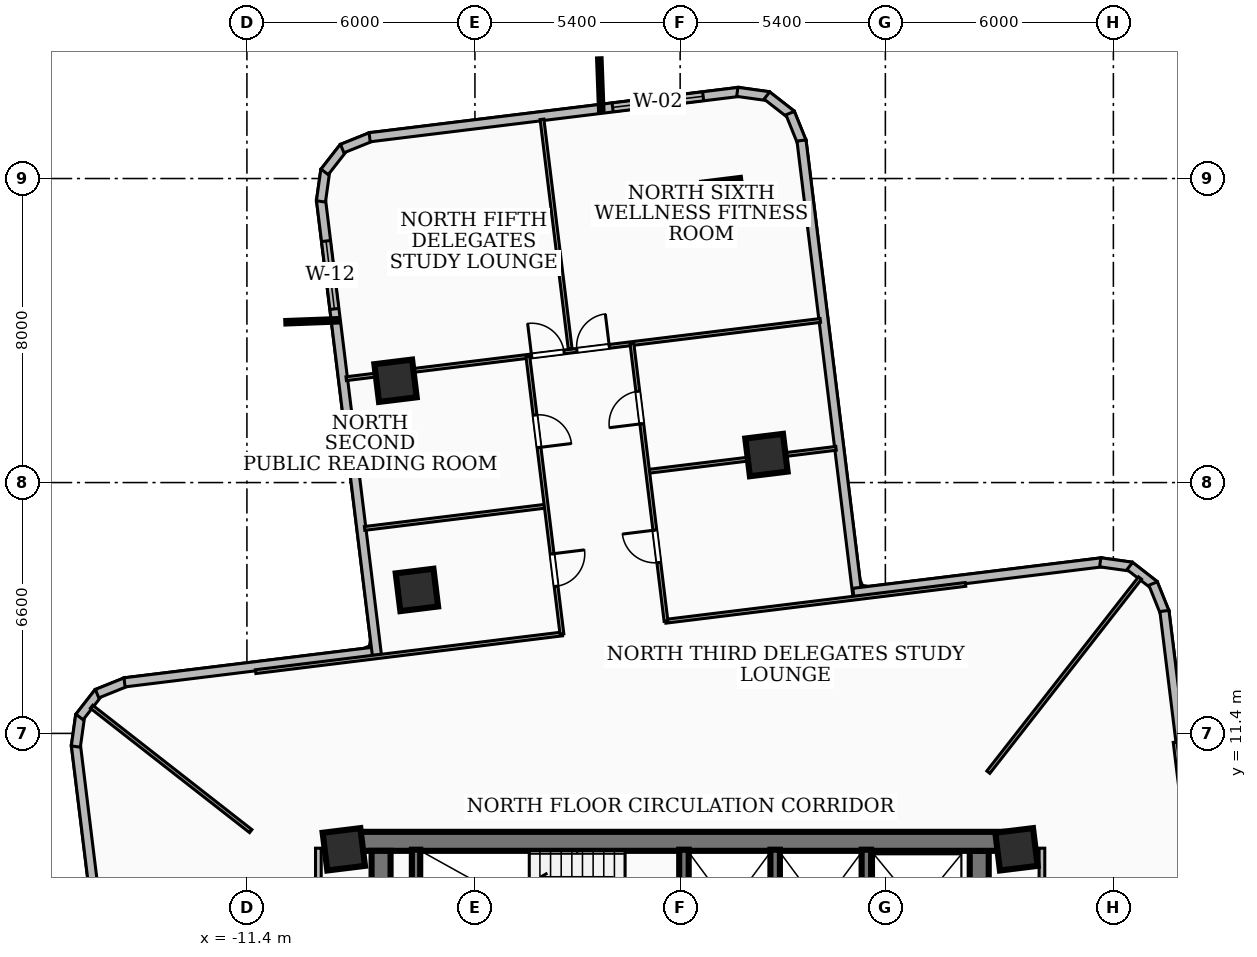
"""IFC4 building model, lengths in metres.
Left out: names, types, materials, properties, quantities, classifications, styles, units other than length and angle.
Written with IfcOpenShell. Run it as: python <this file> out.ifc"""

import sys

from ifc_helpers import new_model, si_unit, direction, frame, frame_2d, origin, origin_2d, place, context, subcontext, project, spatial, rectangle, extrude, element, fill, save


model = new_model("IFC4")
c1 = context("Model", 3, precision=1e-05, world=origin(), true_north=direction((0.0, 1.0)))
c2 = subcontext(c1, "Body", "Model", "MODEL_VIEW")
j1 = project(units=[si_unit("LENGTHUNIT", "METRE"), si_unit("PLANEANGLEUNIT", "RADIAN")], contexts=[c1])
p1 = place(None, origin())
s1 = spatial("IfcSite", under=j1, at=p1, CompositionType="ELEMENT")
p2 = place(p1, origin())
s2 = spatial("IfcBuilding", under=s1, at=p2, CompositionType="ELEMENT")
p3 = place(p2, frame((0.0, 0.0, 78.48)))
s3 = spatial("IfcBuildingStorey", under=s2, at=p3, CompositionType="ELEMENT", Elevation=78.48)
p4 = place(p3, frame((-8.78, 8.56, 0.0), z_axis=(0.0, 0.0, 1.0), x_axis=(1.0, 0.0, 0.0)))
e1 = element("IfcWall", 1, at=p4, inside=s3, PredefinedType="SHEAR", context=c2, shape_type="SweptSolid", body=[
    extrude(rectangle(XDim=17.56, YDim=0.5, at=frame_2d((8.78, 0.0))), origin(), (0.0, 0.0, 1.0), 3.34),
])
for number, where, z_axis, x_axis in (
    (2, (-7.87, 2.0, 0.0), (0.0, 0.0, 1.0), (0.0, 1.0, 0.0)),
    (3, (7.87, 8.31, 0.0), (0.0, 0.0, 1.0), (0.0, -1.0, 0.0)),
):
    element("IfcWall", number, at=place(p3, frame(where, z_axis=z_axis, x_axis=x_axis)), inside=s3, PredefinedType="SHEAR", context=c2, shape_type="SweptSolid", body=[
        extrude(rectangle(XDim=6.31, YDim=0.5, at=frame_2d((3.155, 0.0))), origin(), (0.0, 0.0, 1.0), 3.34),
    ])
p5 = place(p3, frame((-6.95, 5.28, 0.0), z_axis=(0.0, 0.0, 1.0), x_axis=(0.0, 1.0, 0.0)))
e4 = element("IfcWall", 4, at=p5, inside=s3, PredefinedType="SOLIDWALL", context=c2, shape_type="SweptSolid", body=[
    extrude(rectangle(XDim=3.06, YDim=0.22, at=frame_2d((1.53, 0.0))), origin(), (0.0, 0.0, 1.0), 3.34),
])
for number, where, z_axis, x_axis in (
    (5, (0.1, 5.3, 0.0), (0.0, 0.0, 1.0), (0.0, 1.0, 0.0)),
    (6, (2.5, 5.3, 0.0), (0.0, 0.0, 1.0), (0.0, 1.0, 0.0)),
    (7, (4.9, 5.3, 0.0), (0.0, 0.0, 1.0), (0.0, 1.0, 0.0)),
):
    element("IfcWall", number, at=place(p3, frame(where, z_axis=z_axis, x_axis=x_axis)), inside=s3, PredefinedType="SOLIDWALL", context=c2, shape_type="SweptSolid", body=[
        extrude(rectangle(XDim=3.04, YDim=0.25, at=frame_2d((1.52, 0.0))), origin(), (0.0, 0.0, 1.0), 3.34),
    ])
for number, where, z_axis, x_axis in (
    (8, (-8.85, 8.35, 0.0), (0.0, 0.0, 1.0), (0.993, 0.122, 0.0)),
    (9, (8.85, 8.35, 0.0), (0.0, 0.0, 1.0), (0.993, 0.122, 0.0)),
    (10, (2.271, 18.724, 0.0), (0.0, 0.0, 1.0), (0.993, 0.122, 0.0)),
    (11, (-6.927, 15.175, 0.0), (0.0, 0.0, 1.0), (0.993, 0.122, 0.0)),
    (12, (1.139, 25.457, 0.0), (0.0, 0.0, 1.0), (0.993, 0.122, 0.0)),
    (13, (-7.489, 20.679, 0.0), (0.0, 0.0, 1.0), (0.993, 0.122, 0.0)),
):
    element("IfcColumn", number, at=place(p3, frame(where, z_axis=z_axis, x_axis=x_axis)), inside=s3, PredefinedType="COLUMN", context=c2, shape_type="SweptSolid", body=[
        extrude(rectangle(XDim=1.0, YDim=1.0, at=origin_2d()), origin(), (0.0, 0.0, 1.0), 3.6),
    ])
p6 = place(p3, frame((-15.098, 4.558, 0.0), z_axis=(0.0, 0.0, 1.0), x_axis=(-0.121938646341, 0.992537639855, 0.0)))
e14 = element("IfcWall", 14, at=p6, inside=s3, PredefinedType="SOLIDWALL", context=c2, shape_type="SweptSolid", body=[
    extrude(rectangle(XDim=6.595, YDim=0.24, at=frame_2d((3.298, 0.0))), origin(), (0.0, 0.0, 1.0), 3.34),
])
p7 = place(p3, frame((-15.902, 11.054, 0.0), z_axis=(0.0, 0.0, 1.0), x_axis=(0.138376981782, 0.990379629694, 0.0)))
e15 = element("IfcWall", 15, at=p7, inside=s3, PredefinedType="SOLIDWALL", context=c2, shape_type="SweptSolid", body=[
    extrude(rectangle(XDim=0.831, YDim=0.24, at=frame_2d((0.416, 0.0))), origin(), (0.0, 0.0, 1.0), 3.34),
])
p8 = place(p3, frame((-15.805, 11.832, 0.0), z_axis=(0.0, 0.0, 1.0), x_axis=(0.614397431824, 0.788996702001, 0.0)))
e16 = element("IfcWall", 16, at=p8, inside=s3, PredefinedType="SOLIDWALL", context=c2, shape_type="SweptSolid", body=[
    extrude(rectangle(XDim=0.814, YDim=0.24, at=frame_2d((0.407, 0.0))), origin(), (0.0, 0.0, 1.0), 3.34),
])
p9 = place(p3, frame((-15.343, 12.445, 0.0), z_axis=(0.0, 0.0, 1.0), x_axis=(0.927724225254, 0.37326634174, 0.0)))
e17 = element("IfcWall", 17, at=p9, inside=s3, PredefinedType="SOLIDWALL", context=c2, shape_type="SweptSolid", body=[
    extrude(rectangle(XDim=0.83, YDim=0.24, at=frame_2d((0.415, 0.0))), origin(), (0.0, 0.0, 1.0), 3.34),
])
p10 = place(p3, frame((-14.621, 12.743, 0.0), z_axis=(0.0, 0.0, 1.0), x_axis=(0.992536263595, 0.121949848087, 0.0)))
e18 = element("IfcWall", 18, at=p10, inside=s3, PredefinedType="SOLIDWALL", context=c2, shape_type="SweptSolid", body=[
    extrude(rectangle(XDim=6.775, YDim=0.24, at=frame_2d((3.387, 0.0))), origin(), (0.0, 0.0, 1.0), 3.34),
])
p11 = place(p3, frame((-7.98, 13.462, 0.0), z_axis=(0.0, 0.0, 1.0), x_axis=(-0.12189689255, 0.992542768644, 0.0)))
e19 = element("IfcWall", 19, at=p11, inside=s3, PredefinedType="SOLIDWALL", context=c2, shape_type="SweptSolid", body=[
    extrude(rectangle(XDim=12.075, YDim=0.24, at=frame_2d((6.038, 0.0))), origin(), (0.0, 0.0, 1.0), 3.34),
])
p12 = place(p11, frame((9.175, 0.0, 0.85)))
e20 = element("IfcOpeningElement", 20, at=p12, cuts=e19, PredefinedType="OPENING", context=c2, shape_type="SweptSolid", body=[
    extrude(rectangle(XDim=1.8, YDim=1.6, at=frame_2d((0.9, 0.8))), frame((0.0, 0.13, 0.0), z_axis=(0.0, -1.0, 0.0), x_axis=(1.0, 0.0, 0.0)), (0.0, 0.0, 1.0), 0.26),
])
p13 = place(p3, frame((-9.452, 25.397, 0.0), z_axis=(0.0, 0.0, 1.0), x_axis=(0.138376981782, 0.990379629694, 0.0)))
e21 = element("IfcWall", 21, at=p13, inside=s3, PredefinedType="SOLIDWALL", context=c2, shape_type="SweptSolid", body=[
    extrude(rectangle(XDim=0.831, YDim=0.24, at=frame_2d((0.416, 0.0))), origin(), (0.0, 0.0, 1.0), 3.34),
])
p14 = place(p3, frame((-9.355, 26.175, 0.0), z_axis=(0.0, 0.0, 1.0), x_axis=(0.614542882467, 0.788883416995, 0.0)))
e22 = element("IfcWall", 22, at=p14, inside=s3, PredefinedType="SOLIDWALL", context=c2, shape_type="SweptSolid", body=[
    extrude(rectangle(XDim=0.814, YDim=0.24, at=frame_2d((0.407, 0.0))), origin(), (0.0, 0.0, 1.0), 3.34),
])
p15 = place(p3, frame((-8.893, 26.788, 0.0), z_axis=(0.0, 0.0, 1.0), x_axis=(0.927724225254, 0.37326634174, 0.0)))
e23 = element("IfcWall", 23, at=p15, inside=s3, PredefinedType="SOLIDWALL", context=c2, shape_type="SweptSolid", body=[
    extrude(rectangle(XDim=0.83, YDim=0.24, at=frame_2d((0.415, 0.0))), origin(), (0.0, 0.0, 1.0), 3.34),
])
p16 = place(p3, frame((-8.171, 27.086, 0.0), z_axis=(0.0, 0.0, 1.0), x_axis=(0.992545782156, 0.121872352585, 0.0)))
e24 = element("IfcWall", 24, at=p16, inside=s3, PredefinedType="SOLIDWALL", context=c2, shape_type="SweptSolid", body=[
    extrude(rectangle(XDim=9.798, YDim=0.24, at=frame_2d((4.899, 0.0))), origin(), (0.0, 0.0, 1.0), 3.34),
])
p17 = place(p16, frame((6.442, 0.0, 0.85)))
e25 = element("IfcOpeningElement", 25, at=p17, cuts=e24, PredefinedType="OPENING", context=c2, shape_type="SweptSolid", body=[
    extrude(rectangle(XDim=2.4, YDim=2.1, at=frame_2d((1.2, 1.05))), frame((0.0, 0.13, 0.0), z_axis=(0.0, -1.0, 0.0), x_axis=(1.0, 0.0, 0.0)), (0.0, 0.0, 1.0), 0.26),
])
p18 = place(p3, frame((1.504, 28.28, 0.0), z_axis=(0.0, 0.0, 1.0), x_axis=(0.990540037659, -0.137224027762, 0.0)))
e26 = element("IfcWall", 26, at=p18, inside=s3, PredefinedType="SOLIDWALL", context=c2, shape_type="SweptSolid", body=[
    extrude(rectangle(XDim=0.831, YDim=0.24, at=frame_2d((0.416, 0.0))), origin(), (0.0, 0.0, 1.0), 3.34),
])
p19 = place(p3, frame((2.282, 28.184, 0.0), z_axis=(0.0, 0.0, 1.0), x_axis=(0.788415071083, -0.615143622001, 0.0)))
e27 = element("IfcWall", 27, at=p19, inside=s3, PredefinedType="SOLIDWALL", context=c2, shape_type="SweptSolid", body=[
    extrude(rectangle(XDim=0.814, YDim=0.24, at=frame_2d((0.407, 0.0))), origin(), (0.0, 0.0, 1.0), 3.34),
])
p20 = place(p3, frame((2.895, 27.721, 0.0), z_axis=(0.0, 0.0, 1.0), x_axis=(0.373927487679, -0.927457941881, 0.0)))
e28 = element("IfcWall", 28, at=p20, inside=s3, PredefinedType="SOLIDWALL", context=c2, shape_type="SweptSolid", body=[
    extrude(rectangle(XDim=0.829, YDim=0.24, at=frame_2d((0.415, 0.0))), origin(), (0.0, 0.0, 1.0), 3.34),
])
p21 = place(p3, frame((3.193, 27.0, 0.0), z_axis=(0.0, 0.0, 1.0), x_axis=(0.12189689255, -0.992542768644, 0.0)))
e29 = element("IfcWall", 29, at=p21, inside=s3, PredefinedType="SOLIDWALL", context=c2, shape_type="SweptSolid", body=[
    extrude(rectangle(XDim=12.075, YDim=0.24, at=frame_2d((6.038, 0.0))), origin(), (0.0, 0.0, 1.0), 2.486),
])
p22 = place(p3, frame((4.558, 15.098, 0.0), z_axis=(0.0, 0.0, 1.0), x_axis=(0.992537639855, 0.121938646341, 0.0)))
e30 = element("IfcWall", 30, at=p22, inside=s3, PredefinedType="SOLIDWALL", context=c2, shape_type="SweptSolid", body=[
    extrude(rectangle(XDim=6.595, YDim=0.24, at=frame_2d((3.298, 0.0))), origin(), (0.0, 0.0, 1.0), 2.486),
])
p23 = place(p3, frame((11.054, 15.902, 0.0), z_axis=(0.0, 0.0, 1.0), x_axis=(0.990379629694, -0.138376981782, 0.0)))
e31 = element("IfcWall", 31, at=p23, inside=s3, PredefinedType="SOLIDWALL", context=c2, shape_type="SweptSolid", body=[
    extrude(rectangle(XDim=0.831, YDim=0.24, at=frame_2d((0.416, 0.0))), origin(), (0.0, 0.0, 1.0), 3.34),
])
p24 = place(p3, frame((11.832, 15.805, 0.0), z_axis=(0.0, 0.0, 1.0), x_axis=(0.788996702001, -0.614397431824, 0.0)))
e32 = element("IfcWall", 32, at=p24, inside=s3, PredefinedType="SOLIDWALL", context=c2, shape_type="SweptSolid", body=[
    extrude(rectangle(XDim=0.814, YDim=0.24, at=frame_2d((0.407, 0.0))), origin(), (0.0, 0.0, 1.0), 3.34),
])
p25 = place(p3, frame((12.445, 15.343, 0.0), z_axis=(0.0, 0.0, 1.0), x_axis=(0.37326634174, -0.927724225254, 0.0)))
e33 = element("IfcWall", 33, at=p25, inside=s3, PredefinedType="SOLIDWALL", context=c2, shape_type="SweptSolid", body=[
    extrude(rectangle(XDim=0.83, YDim=0.24, at=frame_2d((0.415, 0.0))), origin(), (0.0, 0.0, 1.0), 3.34),
])
p26 = place(p3, frame((12.743, 14.621, 0.0), z_axis=(0.0, 0.0, 1.0), x_axis=(0.121949848087, -0.992536263595, 0.0)))
e34 = element("IfcWall", 34, at=p26, inside=s3, PredefinedType="SOLIDWALL", context=c2, shape_type="SweptSolid", body=[
    extrude(rectangle(XDim=6.775, YDim=0.24, at=frame_2d((3.387, 0.0))), origin(), (0.0, 0.0, 1.0), 2.644),
])
for number, where, z_axis, x_axis in (
    (35, (-9.52, 1.75, 0.0), (0.0, 0.0, 1.0), (0.0, 1.0, 0.0)),
    (36, (9.52, 1.75, 0.0), (0.0, 0.0, 1.0), (0.0, 1.0, 0.0)),
):
    element("IfcWall", number, at=place(p3, frame(where, z_axis=z_axis, x_axis=x_axis)), inside=s3, PredefinedType="PARTITIONING", context=c2, shape_type="SweptSolid", body=[
        extrude(rectangle(XDim=6.63, YDim=0.15, at=frame_2d((3.315, 0.0))), origin(), (0.0, 0.0, 1.0), 2.486),
    ])
p27 = place(p3, frame((8.11, 10.38, 0.0), z_axis=(0.0, 0.0, 1.0), x_axis=(0.615665236773, 0.788007814828, 0.0)))
e37 = element("IfcWall", 37, at=p27, inside=s3, PredefinedType="PARTITIONING", context=c2, shape_type="SweptSolid", body=[
    extrude(rectangle(XDim=6.482, YDim=0.1, at=frame_2d((3.241, 0.0))), origin(), (0.0, 0.0, 1.0), 2.644),
])
p28 = place(p3, frame((-11.3, 8.829, 0.0), z_axis=(0.0, 0.0, 1.0), x_axis=(-0.788014623364, 0.61565652223, 0.0)))
e38 = element("IfcWall", 38, at=p28, inside=s3, PredefinedType="PARTITIONING", context=c2, shape_type="SweptSolid", body=[
    extrude(rectangle(XDim=5.315, YDim=0.1, at=frame_2d((2.657, 0.0))), origin(), (0.0, 0.0, 1.0), 3.34),
])
for number, where, z_axis, x_axis in (
    (39, (14.017, 3.101, 0.0), (0.0, 0.0, 1.0), (-0.122, 0.993, 0.0)),
    (40, (-3.101, 14.017, 0.0), (0.0, 0.0, 1.0), (-0.993, -0.122, 0.0)),
):
    element("IfcWall", number, at=place(p3, frame(where, z_axis=z_axis, x_axis=x_axis)), inside=s3, PredefinedType="PARTITIONING", context=c2, shape_type="SweptSolid", body=[
        extrude(rectangle(XDim=8.13, YDim=0.1, at=frame_2d((4.065, 0.0))), origin(), (0.0, 0.0, 1.0), 2.486),
    ])
p29 = place(p3, frame((7.509, 15.32, 0.0), z_axis=(0.0, 0.0, 1.0), x_axis=(-0.992529957607, -0.122001160868, 0.0)))
e41 = element("IfcWall", 41, at=p29, inside=s3, PredefinedType="PARTITIONING", context=c2, shape_type="SweptSolid", body=[
    extrude(rectangle(XDim=7.95, YDim=0.1, at=frame_2d((3.975, 0.0))), origin(), (0.0, 0.0, 1.0), 2.486),
])
p30 = place(p3, frame((-3.544, 17.378, 0.0), z_axis=(0.0, 0.0, 1.0), x_axis=(-0.992530372873, -0.121997782455, 0.0)))
e42 = element("IfcWall", 42, at=p30, inside=s3, PredefinedType="PARTITIONING", context=c2, shape_type="SweptSolid", body=[
    extrude(rectangle(XDim=4.795, YDim=0.1, at=frame_2d((2.397, 0.0))), origin(), (0.0, 0.0, 1.0), 2.486),
])
p31 = place(p3, frame((4.102, 18.901, 0.0), z_axis=(0.0, 0.0, 1.0), x_axis=(-0.992554700093, -0.121799701653, 0.0)))
e43 = element("IfcWall", 43, at=p31, inside=s3, PredefinedType="PARTITIONING", context=c2, shape_type="SweptSolid", body=[
    extrude(rectangle(XDim=4.975, YDim=0.1, at=frame_2d((2.488, 0.0))), origin(), (0.0, 0.0, 1.0), 2.486),
])
p32 = place(p3, frame((-4.008, 21.32, 0.0), z_axis=(0.0, 0.0, 1.0), x_axis=(0.12187066259, -0.992545989665, 0.0)))
e44 = element("IfcWall", 44, at=p32, inside=s3, PredefinedType="PARTITIONING", context=c2, shape_type="SweptSolid", body=[
    extrude(rectangle(XDim=7.36, YDim=0.1, at=frame_2d((3.68, 0.0))), origin(), (0.0, 0.0, 1.0), 3.34),
])
p33 = place(p32, frame((5.235, 0.0, 0.0)))
e45 = element("IfcOpeningElement", 45, at=p33, cuts=e44, PredefinedType="OPENING", context=c2, shape_type="SweptSolid", body=[
    extrude(rectangle(XDim=0.86, YDim=2.04, at=frame_2d((0.43, 1.02))), frame((0.0, 0.06, 0.0), z_axis=(0.0, -1.0, 0.0), x_axis=(1.0, 0.0, 0.0)), (0.0, 0.0, 1.0), 0.12),
])
p34 = place(p32, frame((1.555, 0.0, 0.0)))
e46 = element("IfcOpeningElement", 46, at=p34, cuts=e44, PredefinedType="OPENING", context=c2, shape_type="SweptSolid", body=[
    extrude(rectangle(XDim=0.86, YDim=2.04, at=frame_2d((0.43, 1.02))), frame((0.0, 0.06, 0.0), z_axis=(0.0, -1.0, 0.0), x_axis=(1.0, 0.0, 0.0)), (0.0, 0.0, 1.0), 0.12),
])
p35 = place(p3, frame((-0.372, 14.352, 0.0), z_axis=(0.0, 0.0, 1.0), x_axis=(-0.121874675173, 0.992545496968, 0.0)))
e47 = element("IfcWall", 47, at=p35, inside=s3, PredefinedType="PARTITIONING", context=c2, shape_type="SweptSolid", body=[
    extrude(rectangle(XDim=7.36, YDim=0.1, at=frame_2d((3.68, 0.0))), origin(), (0.0, 0.0, 1.0), 3.34),
])
p36 = place(p35, frame((1.555, 0.0, 0.0)))
e48 = element("IfcOpeningElement", 48, at=p36, cuts=e47, PredefinedType="OPENING", context=c2, shape_type="SweptSolid", body=[
    extrude(rectangle(XDim=0.86, YDim=2.04, at=frame_2d((0.43, 1.02))), frame((0.0, 0.06, 0.0), z_axis=(0.0, -1.0, 0.0), x_axis=(1.0, 0.0, 0.0)), (0.0, 0.0, 1.0), 0.12),
])
p37 = place(p35, frame((5.235, 0.0, 0.0)))
e49 = element("IfcOpeningElement", 49, at=p37, cuts=e47, PredefinedType="OPENING", context=c2, shape_type="SweptSolid", body=[
    extrude(rectangle(XDim=0.86, YDim=2.04, at=frame_2d((0.43, 1.02))), frame((0.0, 0.06, 0.0), z_axis=(0.0, -1.0, 0.0), x_axis=(1.0, 0.0, 0.0)), (0.0, 0.0, 1.0), 0.12),
])
p38 = place(p3, frame((-2.894, 21.518, 0.0), z_axis=(0.0, 0.0, 1.0), x_axis=(-0.121787270839, 0.992556225441, 0.0)))
e50 = element("IfcWall", 50, at=p38, inside=s3, PredefinedType="PARTITIONING", context=c2, shape_type="SweptSolid", body=[
    extrude(rectangle(XDim=6.084, YDim=0.1, at=frame_2d((3.042, 0.0))), origin(), (0.0, 0.0, 1.0), 2.793),
])
p39 = place(p3, frame((-8.787, 20.733, 0.0), z_axis=(0.0, 0.0, 1.0), x_axis=(0.992533310633, 0.121973879511, 0.0)))
e51 = element("IfcWall", 51, at=p39, inside=s3, PredefinedType="PARTITIONING", context=c2, shape_type="SweptSolid", body=[
    extrude(rectangle(XDim=12.57, YDim=0.1, at=frame_2d((6.285, 0.0))), origin(), (0.0, 0.0, 1.0), 2.486),
])
p40 = place(p39, frame((6.115, 0.0, 0.0)))
e52 = element("IfcOpeningElement", 52, at=p40, cuts=e51, PredefinedType="OPENING", context=c2, shape_type="SweptSolid", body=[
    extrude(rectangle(XDim=0.86, YDim=2.04, at=frame_2d((0.43, 1.02))), frame((0.0, 0.06, 0.0), z_axis=(0.0, -1.0, 0.0), x_axis=(1.0, 0.0, 0.0)), (0.0, 0.0, 1.0), 0.12),
])
p41 = place(p39, frame((4.915, 0.0, 0.0)))
e53 = element("IfcOpeningElement", 53, at=p41, cuts=e51, PredefinedType="OPENING", context=c2, shape_type="SweptSolid", body=[
    extrude(rectangle(XDim=0.86, YDim=2.04, at=frame_2d((0.43, 1.02))), frame((0.0, 0.06, 0.0), z_axis=(0.0, -1.0, 0.0), x_axis=(1.0, 0.0, 0.0)), (0.0, 0.0, 1.0), 0.12),
])
p42 = place(p12, origin())
e54 = element("IfcWindow", 54, at=p42, inside=s3, PartitioningType="SINGLE_PANEL", PredefinedType="WINDOW", context=c2, shape_type="SweptSolid", body=[
    extrude(rectangle(XDim=1.8, YDim=1.6, at=frame_2d((0.9, 0.8))), frame((0.0, 0.03, 0.0), z_axis=(0.0, -1.0, 0.0), x_axis=(1.0, 0.0, 0.0)), (0.0, 0.0, 1.0), 0.06),
])
fill(e20, e54)
p43 = place(p17, origin())
e55 = element("IfcWindow", 55, at=p43, inside=s3, PartitioningType="SINGLE_PANEL", PredefinedType="WINDOW", context=c2, shape_type="SweptSolid", body=[
    extrude(rectangle(XDim=2.4, YDim=2.1, at=frame_2d((1.2, 1.05))), frame((0.0, 0.03, 0.0), z_axis=(0.0, -1.0, 0.0), x_axis=(1.0, 0.0, 0.0)), (0.0, 0.0, 1.0), 0.06),
])
fill(e25, e55)
p44 = place(p33, origin())
e56 = element("IfcDoor", 56, at=p44, inside=s3, OperationType="SINGLE_SWING_LEFT", PredefinedType="DOOR", context=c2, shape_type="SweptSolid", body=[
    extrude(rectangle(XDim=0.86, YDim=2.04, at=frame_2d((0.43, 1.02))), frame((0.0, 0.025, 0.0), z_axis=(0.0, -1.0, 0.0), x_axis=(1.0, 0.0, 0.0)), (0.0, 0.0, 1.0), 0.05),
])
fill(e45, e56)
p45 = place(p34, origin())
e57 = element("IfcDoor", 57, at=p45, inside=s3, OperationType="SINGLE_SWING_RIGHT", PredefinedType="DOOR", context=c2, shape_type="SweptSolid", body=[
    extrude(rectangle(XDim=0.86, YDim=2.04, at=frame_2d((0.43, 1.02))), frame((0.0, 0.025, 0.0), z_axis=(0.0, -1.0, 0.0), x_axis=(1.0, 0.0, 0.0)), (0.0, 0.0, 1.0), 0.05),
])
fill(e46, e57)
p46 = place(p36, origin())
e58 = element("IfcDoor", 58, at=p46, inside=s3, OperationType="SINGLE_SWING_RIGHT", PredefinedType="DOOR", context=c2, shape_type="SweptSolid", body=[
    extrude(rectangle(XDim=0.86, YDim=2.04, at=frame_2d((0.43, 1.02))), frame((0.0, 0.025, 0.0), z_axis=(0.0, -1.0, 0.0), x_axis=(1.0, 0.0, 0.0)), (0.0, 0.0, 1.0), 0.05),
])
fill(e48, e58)
p47 = place(p37, origin())
e59 = element("IfcDoor", 59, at=p47, inside=s3, OperationType="SINGLE_SWING_LEFT", PredefinedType="DOOR", context=c2, shape_type="SweptSolid", body=[
    extrude(rectangle(XDim=0.86, YDim=2.04, at=frame_2d((0.43, 1.02))), frame((0.0, 0.025, 0.0), z_axis=(0.0, -1.0, 0.0), x_axis=(1.0, 0.0, 0.0)), (0.0, 0.0, 1.0), 0.05),
])
fill(e49, e59)
p48 = place(p40, origin())
e60 = element("IfcDoor", 60, at=p48, inside=s3, OperationType="SINGLE_SWING_RIGHT", PredefinedType="DOOR", context=c2, shape_type="SweptSolid", body=[
    extrude(rectangle(XDim=0.86, YDim=2.04, at=frame_2d((0.43, 1.02))), frame((0.0, 0.025, 0.0), z_axis=(0.0, -1.0, 0.0), x_axis=(1.0, 0.0, 0.0)), (0.0, 0.0, 1.0), 0.05),
])
fill(e52, e60)
p49 = place(p41, origin())
e61 = element("IfcDoor", 61, at=p49, inside=s3, OperationType="SINGLE_SWING_LEFT", PredefinedType="DOOR", context=c2, shape_type="SweptSolid", body=[
    extrude(rectangle(XDim=0.86, YDim=2.04, at=frame_2d((0.43, 1.02))), frame((0.0, 0.025, 0.0), z_axis=(0.0, -1.0, 0.0), x_axis=(1.0, 0.0, 0.0)), (0.0, 0.0, 1.0), 0.05),
])
fill(e53, e61)
save(model, sys.argv[1])
